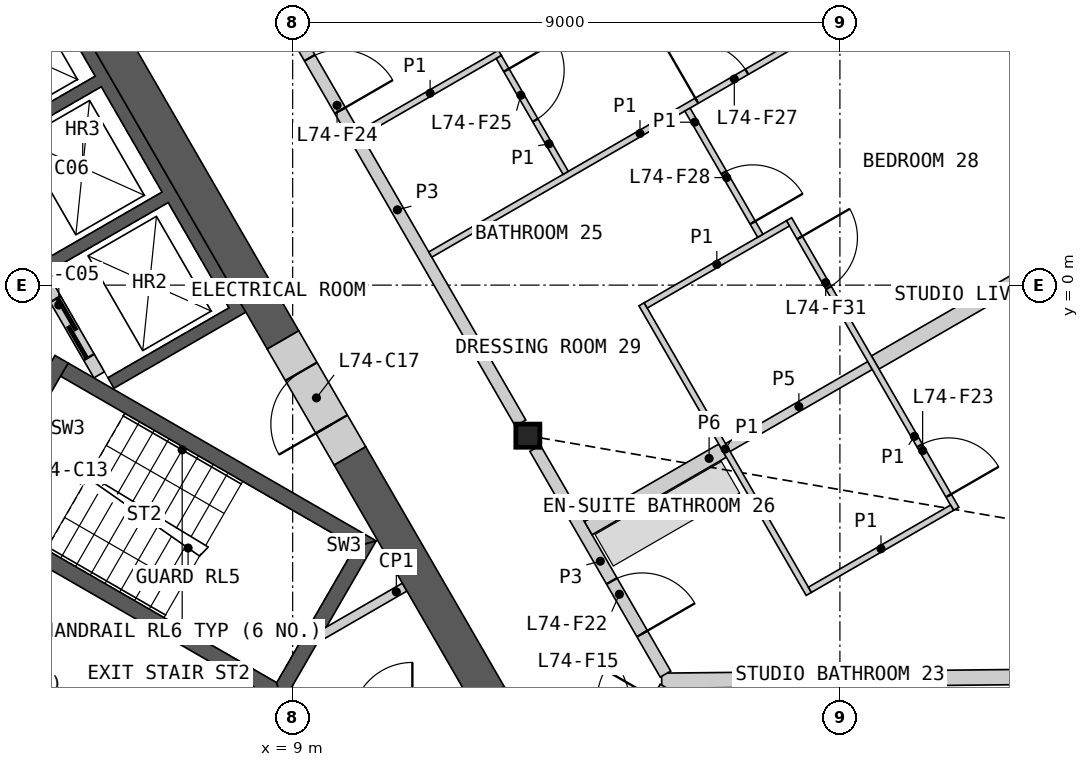
"""IFC4 building model, lengths in metres.
Left out: names, types, materials, properties, quantities, classifications, styles, units other than length and angle.
Written with IfcOpenShell. Run it as: python <this file> out.ifc"""

import sys

from ifc_helpers import new_model, si_unit, direction, frame, frame_2d, origin, origin_2d, place, context, subcontext, project, spatial, polyline, rectangle, i_section, outline, extrude, element, fill, save


model = new_model("IFC4")
c1 = context("Model", 3, precision=1e-05, world=origin(), true_north=direction((0.0, 1.0)))
c2 = subcontext(c1, "Body", "Model", "MODEL_VIEW")
j1 = project(units=[si_unit("LENGTHUNIT", "METRE"), si_unit("PLANEANGLEUNIT", "RADIAN")], contexts=[c1])
p1 = place(None, origin())
s1 = spatial("IfcSite", under=j1, at=p1, CompositionType="ELEMENT")
p2 = place(p1, origin())
s2 = spatial("IfcBuilding", under=s1, at=p2, CompositionType="ELEMENT")
p3 = place(p2, frame((0.0, 0.0, 332.4)))
s3 = spatial("IfcBuildingStorey", under=s2, at=p3, CompositionType="ELEMENT", Elevation=332.4)
p4 = place(p3, frame((12.868, -2.476, 0.0), z_axis=(0.0, 0.0, 1.0), x_axis=(1.0, 0.0, 0.0)))
e1 = element("IfcColumn", 1, at=p4, inside=s3, PredefinedType="COLUMN", context=c2, shape_type="SweptSolid", body=[
    extrude(i_section(OverallWidth=0.396, OverallDepth=0.381, WebThickness=0.019, FlangeThickness=0.03, at=origin_2d()), origin(), (0.0, 0.0, 1.0), 3.4),
])
p5 = place(p3, frame((24.893, 2.667, 0.0), z_axis=(0.0, 0.0, 1.0), x_axis=(-0.951058691075, 0.309010301012, 0.0)))
e2 = element("IfcWall", 2, at=p5, inside=s3, PredefinedType="SOLIDWALL", context=c2, shape_type="SweptSolid", body=[
    extrude(rectangle(XDim=6.411, YDim=0.2, at=frame_2d((3.206, 0.0))), origin(), (0.0, 0.0, 1.0), 2.488),
])
p6 = place(p5, frame((2.262, 0.0, 0.0)))
e3 = element("IfcOpeningElement", 3, at=p6, cuts=e2, PredefinedType="OPENING", context=c2, shape_type="SweptSolid", body=[
    extrude(rectangle(XDim=1.6, YDim=2.25, at=frame_2d((0.8, 1.125))), frame((0.0, 0.11, 0.0), z_axis=(0.0, -1.0, 0.0), x_axis=(1.0, 0.0, 0.0)), (0.0, 0.0, 1.0), 0.22),
])
p7 = place(p3, origin())
e4 = element("IfcWall", 4, at=p7, inside=s3, PredefinedType="SHEAR", context=c2, shape_type="SweptSolid", body=[
    extrude(outline(polyline([(1.561, 6.097), (3.731, 7.35), (8.231, -0.444), (6.061, -1.697), (5.96, -1.524), (7.952, -0.374), (6.952, 1.358), (4.96, 0.208), (4.861, 0.381), (6.852, 1.531), (5.852, 3.263), (3.861, 2.113), (3.76, 2.287), (5.752, 3.437), (4.752, 5.169), (2.76, 4.019), (2.66, 4.192), (4.652, 5.342), (3.652, 7.074), (1.66, 5.924), (1.561, 6.097)])), origin(), (0.0, 0.0, 1.0), 3.1),
])
p8 = place(p3, frame((5.817, -1.476, 0.0), z_axis=(0.0, 0.0, 1.0), x_axis=(-0.500002616675, 0.866023893041, 0.0)))
e5 = element("IfcWall", 5, at=p8, inside=s3, PredefinedType="SOLIDWALL", context=c2, shape_type="SweptSolid", body=[
    extrude(rectangle(XDim=8.373, YDim=0.2, at=frame_2d((4.187, 0.0))), origin(), (0.0, 0.0, 1.0), 3.1),
])
p9 = place(p8, frame((0.337, 0.0, 0.0)))
e6 = element("IfcOpeningElement", 6, at=p9, cuts=e5, PredefinedType="OPENING", context=c2, shape_type="SweptSolid", body=[
    extrude(rectangle(XDim=1.1, YDim=2.1, at=frame_2d((0.55, 1.05))), frame((0.0, 0.11, 0.0), z_axis=(0.0, -1.0, 0.0), x_axis=(1.0, 0.0, 0.0)), (0.0, 0.0, 1.0), 0.22),
])
p10 = place(p8, frame((2.537, 0.0, 0.0)))
e7 = element("IfcOpeningElement", 7, at=p10, cuts=e5, PredefinedType="OPENING", context=c2, shape_type="SweptSolid", body=[
    extrude(rectangle(XDim=1.1, YDim=2.1, at=frame_2d((0.55, 1.05))), frame((0.0, 0.11, 0.0), z_axis=(0.0, -1.0, 0.0), x_axis=(1.0, 0.0, 0.0)), (0.0, 0.0, 1.0), 0.22),
])
p11 = place(p8, frame((4.737, 0.0, 0.0)))
e8 = element("IfcOpeningElement", 8, at=p11, cuts=e5, PredefinedType="OPENING", context=c2, shape_type="SweptSolid", body=[
    extrude(rectangle(XDim=1.1, YDim=2.1, at=frame_2d((0.55, 1.05))), frame((0.0, 0.11, 0.0), z_axis=(0.0, -1.0, 0.0), x_axis=(1.0, 0.0, 0.0)), (0.0, 0.0, 1.0), 0.22),
])
p12 = place(p8, frame((7.037, 0.0, 0.0)))
e9 = element("IfcOpeningElement", 9, at=p12, cuts=e5, PredefinedType="OPENING", context=c2, shape_type="SweptSolid", body=[
    extrude(rectangle(XDim=0.9, YDim=2.1, at=frame_2d((0.45, 1.05))), frame((0.0, 0.11, 0.0), z_axis=(0.0, -1.0, 0.0), x_axis=(1.0, 0.0, 0.0)), (0.0, 0.0, 1.0), 0.22),
])
p13 = place(p3, origin())
e10 = element("IfcWall", 10, at=p13, inside=s3, PredefinedType="SHEAR", context=c2, shape_type="SweptSolid", body=[
    extrude(outline(polyline([(3.763, -3.956), (8.83, -6.881), (8.738, -6.539), (3.888, -3.739), (3.763, -3.956)])), origin(), (0.0, 0.0, 1.0), 3.1),
])
p14 = place(p3, origin())
e11 = element("IfcWall", 11, at=p14, inside=s3, PredefinedType="SHEAR", context=c2, shape_type="SweptSolid", body=[
    extrude(outline(polyline([(8.83, -6.881), (10.374, -4.206), (10.032, -4.298), (8.738, -6.539), (8.83, -6.881)])), origin(), (0.0, 0.0, 1.0), 3.1),
])
p15 = place(p3, origin())
e12 = element("IfcWall", 12, at=p15, inside=s3, PredefinedType="SHEAR", context=c2, shape_type="SweptSolid", body=[
    extrude(outline(polyline([(10.032, -4.298), (10.374, -4.206), (5.307, -1.281), (5.182, -1.498), (10.032, -4.298)])), origin(), (0.0, 0.0, 1.0), 3.1),
])
p16 = place(p3, frame((3.655, -3.893, 0.0), z_axis=(0.0, 0.0, 1.0), x_axis=(0.499982516597, 0.866035497597, 0.0)))
e13 = element("IfcWall", 13, at=p16, inside=s3, PredefinedType="SHEAR", context=c2, shape_type="SweptSolid", body=[
    extrude(rectangle(XDim=3.088, YDim=0.25, at=frame_2d((1.544, 0.0))), origin(), (0.0, 0.0, 1.0), 3.1),
])
p17 = place(p16, frame((0.994, 0.0, 0.0)))
e14 = element("IfcOpeningElement", 14, at=p17, cuts=e13, PredefinedType="OPENING", context=c2, shape_type="SweptSolid", body=[
    extrude(rectangle(XDim=1.1, YDim=2.1, at=frame_2d((0.55, 1.05))), frame((0.0, 0.135, 0.0), z_axis=(0.0, -1.0, 0.0), x_axis=(1.0, 0.0, 0.0)), (0.0, 0.0, 1.0), 0.27),
])
p18 = place(p3, frame((10.842, -4.967, 0.0), z_axis=(0.0, 0.0, 1.0), x_axis=(-0.866098216386, -0.499873863663, 0.0)))
e15 = element("IfcWall", 15, at=p18, inside=s3, PredefinedType="PARTITIONING", context=c2, shape_type="SweptSolid", body=[
    extrude(rectangle(XDim=1.582, YDim=0.15, at=frame_2d((0.791, 0.0))), origin(), (0.0, 0.0, 1.0), 3.1),
])
p19 = place(p3, frame((8.841, -0.902, 0.0), z_axis=(0.0, 0.0, 1.0), x_axis=(-0.499995618375, 0.866027933502, 0.0)))
e16 = element("IfcWall", 16, at=p19, inside=s3, PredefinedType="SHEAR", context=c2, shape_type="SweptSolid", body=[
    extrude(rectangle(XDim=14.571, YDim=0.6, at=frame_2d((7.285, 0.0))), origin(), (0.0, 0.0, 1.0), 3.1),
])
p20 = place(p3, frame((12.221, -6.756, 0.0), z_axis=(0.0, 0.0, 1.0), x_axis=(-0.500020646047, 0.866013483456, 0.0)))
e17 = element("IfcWall", 17, at=p20, inside=s3, PredefinedType="SHEAR", context=c2, shape_type="SweptSolid", body=[
    extrude(rectangle(XDim=4.559, YDim=0.6, at=frame_2d((2.28, 0.0))), origin(), (0.0, 0.0, 1.0), 3.1),
])
p21 = place(p3, origin())
e18 = element("IfcWall", 18, at=p21, inside=s3, PredefinedType="SHEAR", context=c2, shape_type="SweptSolid", body=[
    extrude(outline(polyline([(11.961, -7.506), (11.961, -6.906), (12.48, -6.606), (13.0, -7.506), (11.961, -7.506)])), origin(), (0.0, 0.0, 1.0), 3.1),
])
p22 = place(p3, frame((9.941, -2.807, 0.0), z_axis=(0.0, 0.0, 1.0), x_axis=(-0.499994660107, 0.866028486751, 0.0)))
e19 = element("IfcWall", 19, at=p22, inside=s3, PredefinedType="SHEAR", context=c2, shape_type="SweptSolid", body=[
    extrude(rectangle(XDim=2.2, YDim=0.6, at=frame_2d((1.1, 0.0))), origin(), (0.0, 0.0, 1.0), 3.1),
])
p23 = place(p22, frame((0.6, 0.0, 0.0)))
e20 = element("IfcOpeningElement", 20, at=p23, cuts=e19, PredefinedType="OPENING", context=c2, shape_type="SweptSolid", body=[
    extrude(rectangle(XDim=1.0, YDim=2.1, at=frame_2d((0.5, 1.05))), frame((0.0, 0.31, 0.0), z_axis=(0.0, -1.0, 0.0), x_axis=(1.0, 0.0, 0.0)), (0.0, 0.0, 1.0), 0.62),
])
p24 = place(p3, frame((15.069, -6.507, 0.0), z_axis=(0.0, 0.0, 1.0), x_axis=(0.999946985532, 0.010296898856, 0.0)))
e21 = element("IfcWall", 21, at=p24, inside=s3, PredefinedType="PARTITIONING", context=c2, shape_type="SweptSolid", body=[
    extrude(rectangle(XDim=14.677, YDim=0.25, at=frame_2d((7.338, 0.0))), origin(), (0.0, 0.0, 1.0), 2.33),
])
p25 = place(p3, frame((8.698, 4.745, 0.0), z_axis=(0.0, 0.0, 1.0), x_axis=(0.499984266882, -0.866034487114, 0.0)))
e22 = element("IfcWall", 22, at=p25, inside=s3, PredefinedType="PARTITIONING", context=c2, shape_type="SweptSolid", body=[
    extrude(rectangle(XDim=8.099, YDim=0.2, at=frame_2d((4.049, 0.0))), origin(), (0.0, 0.0, 1.0), 3.1),
])
p26 = place(p25, frame((1.164, 0.0, 0.0)))
e23 = element("IfcOpeningElement", 23, at=p26, cuts=e22, PredefinedType="OPENING", context=c2, shape_type="SweptSolid", body=[
    extrude(rectangle(XDim=1.0, YDim=2.1, at=frame_2d((0.5, 1.05))), frame((0.0, 0.11, 0.0), z_axis=(0.0, -1.0, 0.0), x_axis=(1.0, 0.0, 0.0)), (0.0, 0.0, 1.0), 0.22),
])
p27 = place(p3, frame((18.581, -1.272, 0.0), z_axis=(0.0, 0.0, 1.0), x_axis=(0.866024038922, 0.500002364004, 0.0)))
e24 = element("IfcWall", 24, at=p27, inside=s3, PredefinedType="PARTITIONING", context=c2, shape_type="SweptSolid", body=[
    extrude(rectangle(XDim=7.198, YDim=0.25, at=frame_2d((3.599, 0.0))), origin(), (0.0, 0.0, 1.0), 2.33),
])
p28 = place(p3, frame((12.988, -2.684, 0.0), z_axis=(0.0, 0.0, 1.0), x_axis=(0.500003406062, -0.866023437285, 0.0)))
e25 = element("IfcWall", 25, at=p28, inside=s3, PredefinedType="PARTITIONING", context=c2, shape_type="SweptSolid", body=[
    extrude(rectangle(XDim=4.288, YDim=0.2, at=frame_2d((2.144, 0.0))), origin(), (0.0, 0.0, 1.0), 3.1),
])
p29 = place(p28, frame((2.521, 0.0, 0.0)))
e26 = element("IfcOpeningElement", 26, at=p29, cuts=e25, PredefinedType="OPENING", context=c2, shape_type="SweptSolid", body=[
    extrude(rectangle(XDim=1.0, YDim=2.1, at=frame_2d((0.5, 1.05))), frame((0.0, 0.11, 0.0), z_axis=(0.0, -1.0, 0.0), x_axis=(1.0, 0.0, 0.0)), (0.0, 0.0, 1.0), 0.22),
])
p30 = place(p3, frame((13.293, -9.797, 0.0), z_axis=(0.0, 0.0, 1.0), x_axis=(0.499967746641, 0.866044024469, 0.0)))
e27 = element("IfcWall", 27, at=p30, inside=s3, PredefinedType="PARTITIONING", context=c2, shape_type="SweptSolid", body=[
    extrude(rectangle(XDim=3.676, YDim=0.2, at=frame_2d((1.838, 0.0))), origin(), (0.0, 0.0, 1.0), 3.1),
])
p31 = place(p30, frame((2.426, 0.0, 0.0)))
e28 = element("IfcOpeningElement", 28, at=p31, cuts=e27, PredefinedType="OPENING", context=c2, shape_type="SweptSolid", body=[
    extrude(rectangle(XDim=1.0, YDim=2.1, at=frame_2d((0.5, 1.05))), frame((0.0, 0.11, 0.0), z_axis=(0.0, -1.0, 0.0), x_axis=(1.0, 0.0, 0.0)), (0.0, 0.0, 1.0), 0.22),
])
p32 = place(p3, frame((13.861, -3.997, 0.0), z_axis=(0.0, 0.0, 1.0), x_axis=(0.866030925526, 0.499990435942, 0.0)))
e29 = element("IfcWall", 29, at=p32, inside=s3, PredefinedType="PARTITIONING", context=c2, shape_type="SweptSolid", body=[
    extrude(rectangle(XDim=2.55, YDim=0.25, at=frame_2d((1.275, 0.0))), origin(), (0.0, 0.0, 1.0), 2.33),
])
p33 = place(p3, frame((16.156, -2.672, 0.0), z_axis=(0.0, 0.0, 1.0), x_axis=(0.866059108428, 0.4999416173, 0.0)))
e30 = element("IfcWall", 30, at=p33, inside=s3, PredefinedType="PLUMBINGWALL", context=c2, shape_type="SweptSolid", body=[
    extrude(rectangle(XDim=2.7, YDim=0.15, at=frame_2d((1.35, 0.0))), origin(), (0.0, 0.0, 1.0), 2.33),
])
p34 = place(p3, frame((11.263, 0.503, 0.0), z_axis=(0.0, 0.0, 1.0), x_axis=(0.866023773276, 0.500002824113, 0.0)))
e31 = element("IfcWall", 31, at=p34, inside=s3, PredefinedType="PARTITIONING", context=c2, shape_type="SweptSolid", body=[
    extrude(rectangle(XDim=7.965, YDim=0.1, at=frame_2d((3.982, 0.0))), origin(), (0.0, 0.0, 1.0), 2.33),
])
p35 = place(p34, frame((5.061, 0.0, 0.0)))
e32 = element("IfcOpeningElement", 32, at=p35, cuts=e31, PredefinedType="OPENING", context=c2, shape_type="SweptSolid", body=[
    extrude(rectangle(XDim=0.95, YDim=2.1, at=frame_2d((0.475, 1.05))), frame((0.0, 0.06, 0.0), z_axis=(0.0, -1.0, 0.0), x_axis=(1.0, 0.0, 0.0)), (0.0, 0.0, 1.0), 0.12),
])
p36 = place(p3, frame((14.738, -0.316, 0.0), z_axis=(0.0, 0.0, 1.0), x_axis=(0.499996545922, -0.866027397988, 0.0)))
e33 = element("IfcWall", 33, at=p36, inside=s3, PredefinedType="PARTITIONING", context=c2, shape_type="SweptSolid", body=[
    extrude(rectangle(XDim=5.5, YDim=0.1, at=frame_2d((2.75, 0.0))), origin(), (0.0, 0.0, 1.0), 2.33),
])
p37 = place(p3, frame((17.163, 1.084, 0.0), z_axis=(0.0, 0.0, 1.0), x_axis=(0.500015767406, -0.866016300277, 0.0)))
e34 = element("IfcWall", 34, at=p37, inside=s3, PredefinedType="PARTITIONING", context=c2, shape_type="SweptSolid", body=[
    extrude(rectangle(XDim=5.5, YDim=0.1, at=frame_2d((2.75, 0.0))), origin(), (0.0, 0.0, 1.0), 2.33),
])
p38 = place(p37, frame((4.3, 0.0, 0.0)))
e35 = element("IfcOpeningElement", 35, at=p38, cuts=e34, PredefinedType="OPENING", context=c2, shape_type="SweptSolid", body=[
    extrude(rectangle(XDim=0.95, YDim=2.1, at=frame_2d((0.475, 1.05))), frame((0.0, 0.06, 0.0), z_axis=(0.0, -1.0, 0.0), x_axis=(1.0, 0.0, 0.0)), (0.0, 0.0, 1.0), 0.12),
])
p39 = place(p37, frame((0.351, 0.0, 0.0)))
e36 = element("IfcOpeningElement", 36, at=p39, cuts=e34, PredefinedType="OPENING", context=c2, shape_type="SweptSolid", body=[
    extrude(rectangle(XDim=0.95, YDim=2.1, at=frame_2d((0.475, 1.05))), frame((0.0, 0.06, 0.0), z_axis=(0.0, -1.0, 0.0), x_axis=(1.0, 0.0, 0.0)), (0.0, 0.0, 1.0), 0.12),
])
for number, where, z_axis, x_axis in (
    (37, (17.506, -5.011, 0.0), (0.0, 0.0, 1.0), (0.866, 0.5, 0.0)),
    (38, (14.806, -0.334, 0.0), (0.0, 0.0, 1.0), (0.866, 0.5, 0.0)),
):
    element("IfcWall", number, at=place(p3, frame(where, z_axis=z_axis, x_axis=x_axis)), inside=s3, PredefinedType="PARTITIONING", context=c2, shape_type="SweptSolid", body=[
        extrude(rectangle(XDim=2.7, YDim=0.1, at=frame_2d((1.35, 0.0))), origin(), (0.0, 0.0, 1.0), 2.33),
    ])
p40 = place(p3, frame((10.113, 2.494, 0.0), z_axis=(0.0, 0.0, 1.0), x_axis=(0.865989200783, 0.500062700197, 0.0)))
e39 = element("IfcWall", 39, at=p40, inside=s3, PredefinedType="PARTITIONING", context=c2, shape_type="SweptSolid", body=[
    extrude(rectangle(XDim=2.65, YDim=0.1, at=frame_2d((1.325, 0.0))), origin(), (0.0, 0.0, 1.0), 2.33),
])
p41 = place(p3, frame((15.493, 2.887, 0.0), z_axis=(0.0, 0.0, 1.0), x_axis=(0.499963527173, -0.866046460357, 0.0)))
e40 = element("IfcWall", 40, at=p41, inside=s3, PredefinedType="PARTITIONING", context=c2, shape_type="SweptSolid", body=[
    extrude(rectangle(XDim=2.396, YDim=0.1, at=frame_2d((1.198, 0.0))), origin(), (0.0, 0.0, 1.0), 2.33),
])
p42 = place(p41, frame((1.196, 0.0, 0.0)))
e41 = element("IfcOpeningElement", 41, at=p42, cuts=e40, PredefinedType="OPENING", context=c2, shape_type="SweptSolid", body=[
    extrude(rectangle(XDim=0.95, YDim=2.1, at=frame_2d((0.475, 1.05))), frame((0.0, 0.06, 0.0), z_axis=(0.0, -1.0, 0.0), x_axis=(1.0, 0.0, 0.0)), (0.0, 0.0, 1.0), 0.12),
])
p43 = place(p3, frame((12.39, 3.751, 0.0), z_axis=(0.0, 0.0, 1.0), x_axis=(0.50002983664, -0.866008176907, 0.0)))
e42 = element("IfcWall", 42, at=p43, inside=s3, PredefinedType="PARTITIONING", context=c2, shape_type="SweptSolid", body=[
    extrude(rectangle(XDim=2.2, YDim=0.1, at=frame_2d((1.1, 0.0))), origin(), (0.0, 0.0, 1.0), 2.33),
])
p44 = place(p43, frame((0.25, 0.0, 0.0)))
e43 = element("IfcOpeningElement", 43, at=p44, cuts=e42, PredefinedType="OPENING", context=c2, shape_type="SweptSolid", body=[
    extrude(rectangle(XDim=0.95, YDim=2.1, at=frame_2d((0.475, 1.05))), frame((0.0, 0.06, 0.0), z_axis=(0.0, -1.0, 0.0), x_axis=(1.0, 0.0, 0.0)), (0.0, 0.0, 1.0), 0.12),
])
p45 = place(p9, origin())
e44 = element("IfcDoor", 44, at=p45, inside=s3, OperationType="SLIDING_TO_LEFT", PredefinedType="DOOR", context=c2, shape_type="SweptSolid", body=[
    extrude(rectangle(XDim=1.1, YDim=2.1, at=frame_2d((0.55, 1.05))), frame((0.0, 0.025, 0.0), z_axis=(0.0, -1.0, 0.0), x_axis=(1.0, 0.0, 0.0)), (0.0, 0.0, 1.0), 0.05),
])
fill(e6, e44)
p46 = place(p23, origin())
e45 = element("IfcDoor", 45, at=p46, inside=s3, OperationType="SINGLE_SWING_LEFT", PredefinedType="DOOR", context=c2, shape_type="SweptSolid", body=[
    extrude(rectangle(XDim=1.0, YDim=2.1, at=frame_2d((0.5, 1.05))), frame((0.0, 0.055, 0.0), z_axis=(0.0, -1.0, 0.0), x_axis=(1.0, 0.0, 0.0)), (0.0, 0.0, 1.0), 0.05),
])
fill(e20, e45)
p47 = place(p29, origin())
e46 = element("IfcDoor", 46, at=p47, inside=s3, OperationType="SINGLE_SWING_RIGHT", PredefinedType="DOOR", context=c2, shape_type="SweptSolid", body=[
    extrude(rectangle(XDim=1.0, YDim=2.1, at=frame_2d((0.5, 1.05))), frame((0.0, 0.025, 0.0), z_axis=(0.0, -1.0, 0.0), x_axis=(1.0, 0.0, 0.0)), (0.0, 0.0, 1.0), 0.05),
])
fill(e26, e46)
p48 = place(p38, origin())
e47 = element("IfcDoor", 47, at=p48, inside=s3, OperationType="SINGLE_SWING_RIGHT", PredefinedType="DOOR", context=c2, shape_type="SweptSolid", body=[
    extrude(rectangle(XDim=0.95, YDim=2.1, at=frame_2d((0.475, 1.05))), frame((0.0, 0.025, 0.0), z_axis=(0.0, -1.0, 0.0), x_axis=(1.0, 0.0, 0.0)), (0.0, 0.0, 1.0), 0.05),
])
fill(e35, e47)
p49 = place(p26, origin())
e48 = element("IfcDoor", 48, at=p49, inside=s3, OperationType="SINGLE_SWING_RIGHT", PredefinedType="DOOR", context=c2, shape_type="SweptSolid", body=[
    extrude(rectangle(XDim=1.0, YDim=2.1, at=frame_2d((0.5, 1.05))), frame((0.0, 0.025, 0.0), z_axis=(0.0, -1.0, 0.0), x_axis=(1.0, 0.0, 0.0)), (0.0, 0.0, 1.0), 0.05),
])
fill(e23, e48)
p50 = place(p44, origin())
e49 = element("IfcDoor", 49, at=p50, inside=s3, OperationType="SINGLE_SWING_LEFT", PredefinedType="DOOR", context=c2, shape_type="SweptSolid", body=[
    extrude(rectangle(XDim=0.95, YDim=2.1, at=frame_2d((0.475, 1.05))), frame((0.0, 0.025, 0.0), z_axis=(0.0, -1.0, 0.0), x_axis=(1.0, 0.0, 0.0)), (0.0, 0.0, 1.0), 0.05),
])
fill(e43, e49)
p51 = place(p35, origin())
e50 = element("IfcDoor", 50, at=p51, inside=s3, OperationType="SINGLE_SWING_LEFT", PredefinedType="DOOR", context=c2, shape_type="SweptSolid", body=[
    extrude(rectangle(XDim=0.95, YDim=2.1, at=frame_2d((0.475, 1.05))), frame((0.0, 0.025, 0.0), z_axis=(0.0, -1.0, 0.0), x_axis=(1.0, 0.0, 0.0)), (0.0, 0.0, 1.0), 0.05),
])
fill(e32, e50)
p52 = place(p42, origin())
e51 = element("IfcDoor", 51, at=p52, inside=s3, OperationType="SINGLE_SWING_RIGHT", PredefinedType="DOOR", context=c2, shape_type="SweptSolid", body=[
    extrude(rectangle(XDim=0.95, YDim=2.1, at=frame_2d((0.475, 1.05))), frame((0.0, 0.025, 0.0), z_axis=(0.0, -1.0, 0.0), x_axis=(1.0, 0.0, 0.0)), (0.0, 0.0, 1.0), 0.05),
])
fill(e41, e51)
p53 = place(p39, origin())
e52 = element("IfcDoor", 52, at=p53, inside=s3, OperationType="SINGLE_SWING_LEFT", PredefinedType="DOOR", context=c2, shape_type="SweptSolid", body=[
    extrude(rectangle(XDim=0.95, YDim=2.1, at=frame_2d((0.475, 1.05))), frame((0.0, 0.025, 0.0), z_axis=(0.0, -1.0, 0.0), x_axis=(1.0, 0.0, 0.0)), (0.0, 0.0, 1.0), 0.05),
])
fill(e36, e52)
save(model, sys.argv[1])
